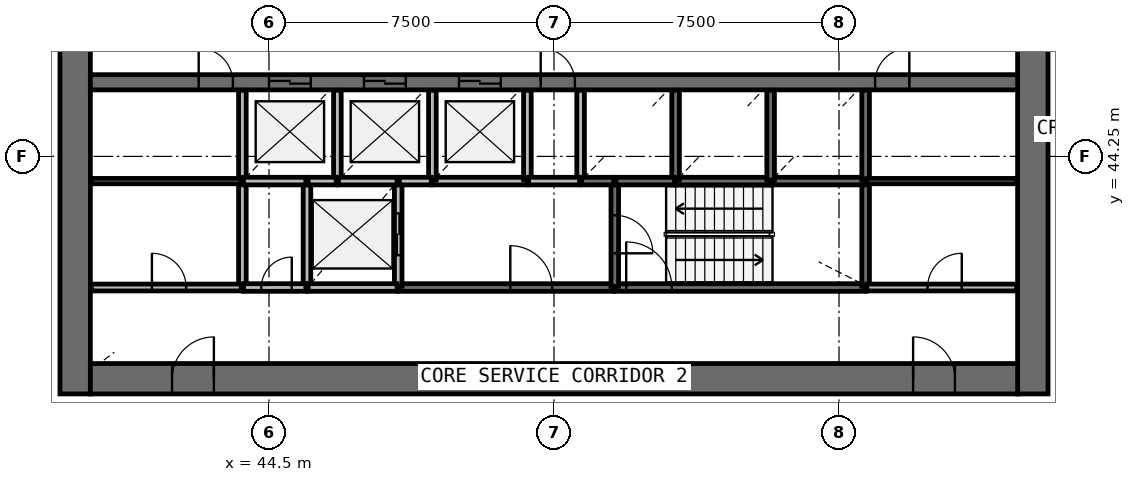
"""IFC4 building model, lengths in metres.
Left out: names, types, materials, properties, quantities, classifications, styles, units other than length and angle.
Written with IfcOpenShell. Run it as: python <this file> out.ifc"""

import sys

from ifc_helpers import new_model, si_unit, direction, frame, frame_2d, origin, place, context, subcontext, project, spatial, rectangle, extrude, source, transform, mapped, element, fill, save


model = new_model("IFC4")
c1 = context("Model", 3, precision=1e-05, world=origin(), true_north=direction((0.0, 1.0)))
c2 = subcontext(c1, "Body", "Model", "MODEL_VIEW")
j1 = project(units=[si_unit("LENGTHUNIT", "METRE"), si_unit("PLANEANGLEUNIT", "RADIAN")], contexts=[c1])
p1 = place(None, origin())
s1 = spatial("IfcSite", under=j1, at=p1, CompositionType="ELEMENT")
p2 = place(p1, origin())
s2 = spatial("IfcBuilding", under=s1, at=p2, CompositionType="ELEMENT")
p3 = place(p2, frame((0.0, 0.0, 124.9)))
s3 = spatial("IfcBuildingStorey", under=s2, at=p3, CompositionType="ELEMENT", Elevation=124.9)
p4 = place(p3, frame((64.6, 38.0, 0.0), z_axis=(0.0, 0.0, 1.0), x_axis=(0.0, 1.0, 0.0)))
e1 = element("IfcWall", 1, at=p4, inside=s3, PredefinedType="SHEAR", context=c2, shape_type="SweptSolid", body=[
    extrude(rectangle(XDim=20.0, YDim=0.8, at=frame_2d((10.0, 0.0))), origin(), (0.0, 0.0, 1.0), 4.1),
])
p5 = place(p4, frame((9.1, 0.0, 0.0)))
e2 = element("IfcOpeningElement", 2, at=p5, cuts=e1, PredefinedType="OPENING", context=c2, shape_type="SweptSolid", body=[
    extrude(rectangle(XDim=1.8, YDim=2.1, at=frame_2d((0.9, 1.05))), frame((0.0, 0.41, 0.0), z_axis=(0.0, -1.0, 0.0), x_axis=(1.0, 0.0, 0.0)), (0.0, 0.0, 1.0), 0.82),
])
p6 = place(p3, frame((39.4, 58.0, 0.0), z_axis=(0.0, 0.0, 1.0), x_axis=(0.0, -1.0, 0.0)))
e3 = element("IfcWall", 3, at=p6, inside=s3, PredefinedType="SHEAR", context=c2, shape_type="SweptSolid", body=[
    extrude(rectangle(XDim=20.0, YDim=0.8, at=frame_2d((10.0, 0.0))), origin(), (0.0, 0.0, 1.0), 4.1),
])
p7 = place(p6, frame((9.1, 0.0, 0.0)))
e4 = element("IfcOpeningElement", 4, at=p7, cuts=e3, PredefinedType="OPENING", context=c2, shape_type="SweptSolid", body=[
    extrude(rectangle(XDim=1.8, YDim=2.1, at=frame_2d((0.9, 1.05))), frame((0.0, 0.41, 0.0), z_axis=(0.0, -1.0, 0.0), x_axis=(1.0, 0.0, 0.0)), (0.0, 0.0, 1.0), 0.82),
])
p8 = place(p3, frame((39.8, 38.4, 0.0), z_axis=(0.0, 0.0, 1.0), x_axis=(1.0, 0.0, 0.0)))
e5 = element("IfcWall", 5, at=p8, inside=s3, PredefinedType="SHEAR", context=c2, shape_type="SweptSolid", body=[
    extrude(rectangle(XDim=24.4, YDim=0.8, at=frame_2d((12.2, 0.0))), origin(), (0.0, 0.0, 1.0), 4.1),
])
p9 = place(p8, frame((21.65, 0.0, 0.0)))
e6 = element("IfcOpeningElement", 6, at=p9, cuts=e5, PredefinedType="OPENING", context=c2, shape_type="SweptSolid", body=[
    extrude(rectangle(XDim=1.1, YDim=2.1, at=frame_2d((0.55, 1.05))), frame((0.0, 0.41, 0.0), z_axis=(0.0, -1.0, 0.0), x_axis=(1.0, 0.0, 0.0)), (0.0, 0.0, 1.0), 0.82),
])
p10 = place(p8, frame((2.15, 0.0, 0.0)))
e7 = element("IfcOpeningElement", 7, at=p10, cuts=e5, PredefinedType="OPENING", context=c2, shape_type="SweptSolid", body=[
    extrude(rectangle(XDim=1.1, YDim=2.1, at=frame_2d((0.55, 1.05))), frame((0.0, 0.41, 0.0), z_axis=(0.0, -1.0, 0.0), x_axis=(1.0, 0.0, 0.0)), (0.0, 0.0, 1.0), 0.82),
])
p11 = place(p3, frame((39.8, 46.2, 0.0), z_axis=(0.0, 0.0, 1.0), x_axis=(1.0, 0.0, 0.0)))
e8 = element("IfcWall", 8, at=p11, inside=s3, PredefinedType="SHEAR", context=c2, shape_type="SweptSolid", body=[
    extrude(rectangle(XDim=24.4, YDim=0.4, at=frame_2d((12.2, 0.0))), origin(), (0.0, 0.0, 1.0), 4.1),
])
p12 = place(p11, frame((4.7, 0.0, 0.0)))
e9 = element("IfcOpeningElement", 9, at=p12, cuts=e8, PredefinedType="OPENING", context=c2, shape_type="SweptSolid", body=[
    extrude(rectangle(XDim=1.1, YDim=2.1, at=frame_2d((0.55, 1.05))), frame((0.0, 0.21, 0.0), z_axis=(0.0, -1.0, 0.0), x_axis=(1.0, 0.0, 0.0)), (0.0, 0.0, 1.0), 0.42),
])
p13 = place(p11, frame((7.2, 0.0, 0.0)))
e10 = element("IfcOpeningElement", 10, at=p13, cuts=e8, PredefinedType="OPENING", context=c2, shape_type="SweptSolid", body=[
    extrude(rectangle(XDim=1.1, YDim=2.1, at=frame_2d((0.55, 1.05))), frame((0.0, 0.21, 0.0), z_axis=(0.0, -1.0, 0.0), x_axis=(1.0, 0.0, 0.0)), (0.0, 0.0, 1.0), 0.42),
])
p14 = place(p11, frame((9.7, 0.0, 0.0)))
e11 = element("IfcOpeningElement", 11, at=p14, cuts=e8, PredefinedType="OPENING", context=c2, shape_type="SweptSolid", body=[
    extrude(rectangle(XDim=1.1, YDim=2.1, at=frame_2d((0.55, 1.05))), frame((0.0, 0.21, 0.0), z_axis=(0.0, -1.0, 0.0), x_axis=(1.0, 0.0, 0.0)), (0.0, 0.0, 1.0), 0.42),
])
p15 = place(p11, frame((20.65, 0.0, 0.0)))
e12 = element("IfcOpeningElement", 12, at=p15, cuts=e8, PredefinedType="OPENING", context=c2, shape_type="SweptSolid", body=[
    extrude(rectangle(XDim=0.9, YDim=2.1, at=frame_2d((0.45, 1.05))), frame((0.0, 0.21, 0.0), z_axis=(0.0, -1.0, 0.0), x_axis=(1.0, 0.0, 0.0)), (0.0, 0.0, 1.0), 0.42),
])
p16 = place(p11, frame((2.85, 0.0, 0.0)))
e13 = element("IfcOpeningElement", 13, at=p16, cuts=e8, PredefinedType="OPENING", context=c2, shape_type="SweptSolid", body=[
    extrude(rectangle(XDim=0.9, YDim=2.1, at=frame_2d((0.45, 1.05))), frame((0.0, 0.21, 0.0), z_axis=(0.0, -1.0, 0.0), x_axis=(1.0, 0.0, 0.0)), (0.0, 0.0, 1.0), 0.42),
])
p17 = place(p11, frame((11.85, 0.0, 0.0)))
e14 = element("IfcOpeningElement", 14, at=p17, cuts=e8, PredefinedType="OPENING", context=c2, shape_type="SweptSolid", body=[
    extrude(rectangle(XDim=0.9, YDim=2.1, at=frame_2d((0.45, 1.05))), frame((0.0, 0.21, 0.0), z_axis=(0.0, -1.0, 0.0), x_axis=(1.0, 0.0, 0.0)), (0.0, 0.0, 1.0), 0.42),
])
p18 = place(p3, frame((53.6, 40.8, 0.0), z_axis=(0.0, 0.0, 1.0), x_axis=(1.0, 0.0, 0.0)))
e15 = element("IfcWall", 15, at=p18, inside=s3, PredefinedType="SOLIDWALL", context=c2, shape_type="SweptSolid", body=[
    extrude(rectangle(XDim=6.6, YDim=0.2, at=frame_2d((3.3, 0.0))), origin(), (0.0, 0.0, 1.0), 3.6),
])
p19 = place(p18, frame((0.3, 0.0, 0.0)))
e16 = element("IfcOpeningElement", 16, at=p19, cuts=e15, PredefinedType="OPENING", context=c2, shape_type="SweptSolid", body=[
    extrude(rectangle(XDim=1.2, YDim=2.1, at=frame_2d((0.6, 1.05))), frame((0.0, 0.11, 0.0), z_axis=(0.0, -1.0, 0.0), x_axis=(1.0, 0.0, 0.0)), (0.0, 0.0, 1.0), 0.22),
])
p20 = place(p3, frame((47.9, 40.8, 0.0), z_axis=(0.0, 0.0, 1.0), x_axis=(1.0, 0.0, 0.0)))
e17 = element("IfcWall", 17, at=p20, inside=s3, PredefinedType="SOLIDWALL", context=c2, shape_type="SweptSolid", body=[
    extrude(rectangle(XDim=5.67, YDim=0.2, at=frame_2d((2.835, 0.0))), origin(), (0.0, 0.0, 1.0), 3.6),
])
p21 = place(p20, frame((2.95, 0.0, 0.0)))
e18 = element("IfcOpeningElement", 18, at=p21, cuts=e17, PredefinedType="OPENING", context=c2, shape_type="SweptSolid", body=[
    extrude(rectangle(XDim=1.1, YDim=2.1, at=frame_2d((0.55, 1.05))), frame((0.0, 0.11, 0.0), z_axis=(0.0, -1.0, 0.0), x_axis=(1.0, 0.0, 0.0)), (0.0, 0.0, 1.0), 0.22),
])
for number, where, z_axis, x_axis in (
    (19, (43.8, 43.6, 0.0), (0.0, 0.0, 1.0), (0.0, -1.0, 0.0)),
    (20, (45.5, 43.6, 0.0), (0.0, 0.0, 1.0), (0.0, -1.0, 0.0)),
):
    element("IfcWall", number, at=place(p3, frame(where, z_axis=z_axis, x_axis=x_axis)), inside=s3, PredefinedType="SOLIDWALL", context=c2, shape_type="SweptSolid", body=[
        extrude(rectangle(XDim=2.8, YDim=0.2, at=frame_2d((1.4, 0.0))), origin(), (0.0, 0.0, 1.0), 3.6),
    ])
p22 = place(p3, frame((47.9, 40.83, 0.0), z_axis=(0.0, 0.0, 1.0), x_axis=(0.0, 1.0, 0.0)))
e21 = element("IfcWall", 21, at=p22, inside=s3, PredefinedType="SOLIDWALL", context=c2, shape_type="SweptSolid", body=[
    extrude(rectangle(XDim=2.77, YDim=0.2, at=frame_2d((1.385, 0.0))), origin(), (0.0, 0.0, 1.0), 3.6),
])
p23 = place(p22, frame((0.82, 0.0, 0.0)))
e22 = element("IfcOpeningElement", 22, at=p23, cuts=e21, PredefinedType="OPENING", context=c2, shape_type="SweptSolid", body=[
    extrude(rectangle(XDim=1.1, YDim=2.1, at=frame_2d((0.55, 1.05))), frame((0.0, 0.11, 0.0), z_axis=(0.0, -1.0, 0.0), x_axis=(1.0, 0.0, 0.0)), (0.0, 0.0, 1.0), 0.22),
])
p24 = place(p3, frame((60.2, 40.83, 0.0), z_axis=(0.0, 0.0, 1.0), x_axis=(0.0, 1.0, 0.0)))
e23 = element("IfcWall", 23, at=p24, inside=s3, PredefinedType="SOLIDWALL", context=c2, shape_type="SweptSolid", body=[
    extrude(rectangle(XDim=2.77, YDim=0.2, at=frame_2d((1.385, 0.0))), origin(), (0.0, 0.0, 1.0), 3.6),
])
p25 = place(p3, frame((53.6, 43.6, 0.0), z_axis=(0.0, 0.0, 1.0), x_axis=(0.0, -1.0, 0.0)))
e24 = element("IfcWall", 24, at=p25, inside=s3, PredefinedType="SOLIDWALL", context=c2, shape_type="SweptSolid", body=[
    extrude(rectangle(XDim=2.77, YDim=0.2, at=frame_2d((1.385, 0.0))), origin(), (0.0, 0.0, 1.0), 3.6),
])
p26 = place(p25, frame((0.9, 0.0, 0.0)))
e25 = element("IfcOpeningElement", 25, at=p26, cuts=e24, PredefinedType="OPENING", context=c2, shape_type="SweptSolid", body=[
    extrude(rectangle(XDim=1.0, YDim=2.1, at=frame_2d((0.5, 1.05))), frame((0.0, 0.11, 0.0), z_axis=(0.0, -1.0, 0.0), x_axis=(1.0, 0.0, 0.0)), (0.0, 0.0, 1.0), 0.22),
])
for number, where, z_axis, x_axis in (
    (26, (48.8, 43.6, 0.0), (0.0, 0.0, 1.0), (1.0, 0.0, 0.0)),
    (27, (55.2, 43.6, 0.0), (0.0, 0.0, 1.0), (1.0, 0.0, 0.0)),
):
    element("IfcWall", number, at=place(p3, frame(where, z_axis=z_axis, x_axis=x_axis)), inside=s3, PredefinedType="SOLIDWALL", context=c2, shape_type="SweptSolid", body=[
        extrude(rectangle(XDim=2.5, YDim=0.2, at=frame_2d((1.25, 0.0))), origin(), (0.0, 0.0, 1.0), 3.6),
    ])
p27 = place(p3, frame((57.73, 43.6, 0.0), z_axis=(0.0, 0.0, 1.0), x_axis=(1.0, 0.0, 0.0)))
e28 = element("IfcWall", 28, at=p27, inside=s3, PredefinedType="SOLIDWALL", context=c2, shape_type="SweptSolid", body=[
    extrude(rectangle(XDim=2.44, YDim=0.2, at=frame_2d((1.22, 0.0))), origin(), (0.0, 0.0, 1.0), 3.6),
])
p28 = place(p3, frame((45.53, 40.8, 0.0), z_axis=(0.0, 0.0, 1.0), x_axis=(1.0, 0.0, 0.0)))
e29 = element("IfcWall", 29, at=p28, inside=s3, PredefinedType="SOLIDWALL", context=c2, shape_type="SweptSolid", body=[
    extrude(rectangle(XDim=2.34, YDim=0.2, at=frame_2d((1.17, 0.0))), origin(), (0.0, 0.0, 1.0), 3.6),
])
p29 = place(p3, frame((43.8, 45.99, 0.0), z_axis=(0.0, 0.0, 1.0), x_axis=(0.0, -1.0, 0.0)))
e30 = element("IfcWall", 30, at=p29, inside=s3, PredefinedType="SOLIDWALL", context=c2, shape_type="SweptSolid", body=[
    extrude(rectangle(XDim=2.36, YDim=0.2, at=frame_2d((1.18, 0.0))), origin(), (0.0, 0.0, 1.0), 3.6),
])
p30 = place(p3, frame((46.3, 43.6, 0.0), z_axis=(0.0, 0.0, 1.0), x_axis=(0.0, 1.0, 0.0)))
e31 = element("IfcWall", 31, at=p30, inside=s3, PredefinedType="SOLIDWALL", context=c2, shape_type="SweptSolid", body=[
    extrude(rectangle(XDim=2.39, YDim=0.2, at=frame_2d((1.195, 0.0))), origin(), (0.0, 0.0, 1.0), 3.6),
])
for number, where, z_axis, x_axis in (
    (32, (48.8, 43.63, 0.0), (0.0, 0.0, 1.0), (0.0, 1.0, 0.0)),
    (33, (51.3, 43.63, 0.0), (0.0, 0.0, 1.0), (0.0, 1.0, 0.0)),
):
    element("IfcWall", number, at=place(p3, frame(where, z_axis=z_axis, x_axis=x_axis)), inside=s3, PredefinedType="SOLIDWALL", context=c2, shape_type="SweptSolid", body=[
        extrude(rectangle(XDim=2.36, YDim=0.2, at=frame_2d((1.18, 0.0))), origin(), (0.0, 0.0, 1.0), 3.6),
    ])
p31 = place(p3, frame((52.7, 45.99, 0.0), z_axis=(0.0, 0.0, 1.0), x_axis=(0.0, -1.0, 0.0)))
e34 = element("IfcWall", 34, at=p31, inside=s3, PredefinedType="SOLIDWALL", context=c2, shape_type="SweptSolid", body=[
    extrude(rectangle(XDim=2.39, YDim=0.2, at=frame_2d((1.195, 0.0))), origin(), (0.0, 0.0, 1.0), 3.6),
])
for number, where, z_axis, x_axis in (
    (35, (55.2, 43.63, 0.0), (0.0, 0.0, 1.0), (0.0, 1.0, 0.0)),
    (36, (57.7, 43.63, 0.0), (0.0, 0.0, 1.0), (0.0, 1.0, 0.0)),
    (37, (60.2, 43.63, 0.0), (0.0, 0.0, 1.0), (0.0, 1.0, 0.0)),
):
    element("IfcWall", number, at=place(p3, frame(where, z_axis=z_axis, x_axis=x_axis)), inside=s3, PredefinedType="SOLIDWALL", context=c2, shape_type="SweptSolid", body=[
        extrude(rectangle(XDim=2.36, YDim=0.2, at=frame_2d((1.18, 0.0))), origin(), (0.0, 0.0, 1.0), 3.6),
    ])
p32 = place(p3, frame((43.83, 43.6, 0.0), z_axis=(0.0, 0.0, 1.0), x_axis=(1.0, 0.0, 0.0)))
e38 = element("IfcWall", 38, at=p32, inside=s3, PredefinedType="SOLIDWALL", context=c2, shape_type="SweptSolid", body=[
    extrude(rectangle(XDim=1.64, YDim=0.2, at=frame_2d((0.82, 0.0))), origin(), (0.0, 0.0, 1.0), 3.6),
])
p33 = place(p3, frame((43.83, 40.8, 0.0), z_axis=(0.0, 0.0, 1.0), x_axis=(1.0, 0.0, 0.0)))
e39 = element("IfcWall", 39, at=p33, inside=s3, PredefinedType="SOLIDWALL", context=c2, shape_type="SweptSolid", body=[
    extrude(rectangle(XDim=1.64, YDim=0.2, at=frame_2d((0.82, 0.0))), origin(), (0.0, 0.0, 1.0), 3.6),
])
p34 = place(p33, frame((0.47, 0.0, 0.0)))
e40 = element("IfcOpeningElement", 40, at=p34, cuts=e39, PredefinedType="OPENING", context=c2, shape_type="SweptSolid", body=[
    extrude(rectangle(XDim=0.8, YDim=2.1, at=frame_2d((0.4, 1.05))), frame((0.0, 0.11, 0.0), z_axis=(0.0, -1.0, 0.0), x_axis=(1.0, 0.0, 0.0)), (0.0, 0.0, 1.0), 0.22),
])
for number, where, z_axis, x_axis in (
    (41, (46.33, 43.6, 0.0), (0.0, 0.0, 1.0), (1.0, 0.0, 0.0)),
    (42, (53.63, 43.6, 0.0), (0.0, 0.0, 1.0), (1.0, 0.0, 0.0)),
):
    element("IfcWall", number, at=place(p3, frame(where, z_axis=z_axis, x_axis=x_axis)), inside=s3, PredefinedType="SOLIDWALL", context=c2, shape_type="SweptSolid", body=[
        extrude(rectangle(XDim=1.54, YDim=0.2, at=frame_2d((0.77, 0.0))), origin(), (0.0, 0.0, 1.0), 3.6),
    ])
p35 = place(p3, frame((52.67, 43.6, 0.0), z_axis=(0.0, 0.0, 1.0), x_axis=(-1.0, 0.0, 0.0)))
e43 = element("IfcWall", 43, at=p35, inside=s3, PredefinedType="SOLIDWALL", context=c2, shape_type="SweptSolid", body=[
    extrude(rectangle(XDim=1.34, YDim=0.2, at=frame_2d((0.67, 0.0))), origin(), (0.0, 0.0, 1.0), 3.6),
])
for number, where, z_axis, x_axis in (
    (44, (47.93, 43.6, 0.0), (0.0, 0.0, 1.0), (1.0, 0.0, 0.0)),
    (45, (52.73, 43.6, 0.0), (0.0, 0.0, 1.0), (1.0, 0.0, 0.0)),
):
    element("IfcWall", number, at=place(p3, frame(where, z_axis=z_axis, x_axis=x_axis)), inside=s3, PredefinedType="SOLIDWALL", context=c2, shape_type="SweptSolid", body=[
        extrude(rectangle(XDim=0.84, YDim=0.2, at=frame_2d((0.42, 0.0))), origin(), (0.0, 0.0, 1.0), 3.6),
    ])
p36 = place(p3, frame((45.53, 43.6, 0.0), z_axis=(0.0, 0.0, 1.0), x_axis=(1.0, 0.0, 0.0)))
e46 = element("IfcWall", 46, at=p36, inside=s3, PredefinedType="SOLIDWALL", context=c2, shape_type="SweptSolid", body=[
    extrude(rectangle(XDim=0.74, YDim=0.2, at=frame_2d((0.37, 0.0))), origin(), (0.0, 0.0, 1.0), 3.6),
])
p37 = place(p3, frame((60.23, 40.8, 0.0), z_axis=(0.0, 0.0, 1.0), x_axis=(1.0, 0.0, 0.0)))
e47 = element("IfcWall", 47, at=p37, inside=s3, PredefinedType="PARTITIONING", context=c2, shape_type="SweptSolid", body=[
    extrude(rectangle(XDim=3.95, YDim=0.18, at=frame_2d((1.975, 0.0))), origin(), (0.0, 0.0, 1.0), 3.6),
])
p38 = place(p37, frame((1.6, 0.0, 0.0)))
e48 = element("IfcOpeningElement", 48, at=p38, cuts=e47, PredefinedType="OPENING", context=c2, shape_type="SweptSolid", body=[
    extrude(rectangle(XDim=0.9, YDim=2.1, at=frame_2d((0.45, 1.05))), frame((0.0, 0.1, 0.0), z_axis=(0.0, -1.0, 0.0), x_axis=(1.0, 0.0, 0.0)), (0.0, 0.0, 1.0), 0.2),
])
p39 = place(p3, frame((39.82, 40.8, 0.0), z_axis=(0.0, 0.0, 1.0), x_axis=(1.0, 0.0, 0.0)))
e49 = element("IfcWall", 49, at=p39, inside=s3, PredefinedType="PARTITIONING", context=c2, shape_type="SweptSolid", body=[
    extrude(rectangle(XDim=3.95, YDim=0.18, at=frame_2d((1.975, 0.0))), origin(), (0.0, 0.0, 1.0), 3.6),
])
p40 = place(p39, frame((1.6, 0.0, 0.0)))
e50 = element("IfcOpeningElement", 50, at=p40, cuts=e49, PredefinedType="OPENING", context=c2, shape_type="SweptSolid", body=[
    extrude(rectangle(XDim=0.9, YDim=2.1, at=frame_2d((0.45, 1.05))), frame((0.0, 0.1, 0.0), z_axis=(0.0, -1.0, 0.0), x_axis=(1.0, 0.0, 0.0)), (0.0, 0.0, 1.0), 0.2),
])
for number, where, z_axis, x_axis in (
    (51, (60.23, 43.6, 0.0), (0.0, 0.0, 1.0), (1.0, 0.0, 0.0)),
    (52, (43.77, 43.6, 0.0), (0.0, 0.0, 1.0), (-1.0, 0.0, 0.0)),
):
    element("IfcWall", number, at=place(p3, frame(where, z_axis=z_axis, x_axis=x_axis)), inside=s3, PredefinedType="PARTITIONING", context=c2, shape_type="SweptSolid", body=[
        extrude(rectangle(XDim=3.95, YDim=0.14, at=frame_2d((1.975, 0.0))), origin(), (0.0, 0.0, 1.0), 2.8),
    ])
m1 = source(origin(), c2, "Body", "SweptSolid", [
    extrude(rectangle(XDim=1.1, YDim=2.1, at=frame_2d((0.55, 1.05))), frame((0.0, 0.025, 0.0), z_axis=(0.0, -1.0, 0.0), x_axis=(1.0, 0.0, 0.0)), (0.0, 0.0, 1.0), 0.05),
])
p41 = place(p12, origin())
e53 = element("IfcDoor", 53, at=p41, inside=s3, OperationType="DOUBLE_DOOR_SLIDING", PredefinedType="USERDEFINED", context=c2, shape_type="MappedRepresentation", body=[
    mapped(m1, transform((0.0, 0.0, 0.0), scale=1.0)),
])
fill(e9, e53)
p42 = place(p13, origin())
e54 = element("IfcDoor", 54, at=p42, inside=s3, OperationType="DOUBLE_DOOR_SLIDING", PredefinedType="USERDEFINED", context=c2, shape_type="MappedRepresentation", body=[
    mapped(m1, transform((0.0, 0.0, 0.0), scale=1.0)),
])
fill(e10, e54)
p43 = place(p14, origin())
e55 = element("IfcDoor", 55, at=p43, inside=s3, OperationType="DOUBLE_DOOR_SLIDING", PredefinedType="USERDEFINED", context=c2, shape_type="MappedRepresentation", body=[
    mapped(m1, transform((0.0, 0.0, 0.0), scale=1.0)),
])
fill(e11, e55)
p44 = place(p23, origin())
e56 = element("IfcDoor", 56, at=p44, inside=s3, OperationType="DOUBLE_DOOR_SLIDING", PredefinedType="USERDEFINED", context=c2, shape_type="MappedRepresentation", body=[
    mapped(m1, transform((0.0, 0.0, 0.0), scale=1.0)),
])
fill(e22, e56)
m2 = source(origin(), c2, "Body", "SweptSolid", [
    extrude(rectangle(XDim=1.2, YDim=2.1, at=frame_2d((0.6, 1.05))), frame((0.0, 0.025, 0.0), z_axis=(0.0, -1.0, 0.0), x_axis=(1.0, 0.0, 0.0)), (0.0, 0.0, 1.0), 0.05),
])
p45 = place(p19, origin())
e57 = element("IfcDoor", 57, at=p45, inside=s3, OperationType="SINGLE_SWING_LEFT", PredefinedType="DOOR", context=c2, shape_type="MappedRepresentation", body=[
    mapped(m2, transform((0.0, 0.0, 0.0), scale=1.0)),
])
fill(e16, e57)
m3 = source(origin(), c2, "Body", "SweptSolid", [
    extrude(rectangle(XDim=1.0, YDim=2.1, at=frame_2d((0.5, 1.05))), frame((0.0, 0.025, 0.0), z_axis=(0.0, -1.0, 0.0), x_axis=(1.0, 0.0, 0.0)), (0.0, 0.0, 1.0), 0.05),
])
p46 = place(p26, origin())
e58 = element("IfcDoor", 58, at=p46, inside=s3, OperationType="SINGLE_SWING_RIGHT", PredefinedType="DOOR", context=c2, shape_type="MappedRepresentation", body=[
    mapped(m3, transform((0.0, 0.0, 0.0), scale=1.0)),
])
fill(e25, e58)
m4 = source(origin(), c2, "Body", "SweptSolid", [
    extrude(rectangle(XDim=1.1, YDim=2.1, at=frame_2d((0.55, 1.05))), frame((0.0, 0.025, 0.0), z_axis=(0.0, -1.0, 0.0), x_axis=(1.0, 0.0, 0.0)), (0.0, 0.0, 1.0), 0.05),
])
p47 = place(p21, origin())
e59 = element("IfcDoor", 59, at=p47, inside=s3, OperationType="SINGLE_SWING_LEFT", PredefinedType="DOOR", context=c2, shape_type="MappedRepresentation", body=[
    mapped(m4, transform((0.0, 0.0, 0.0), scale=1.0)),
])
fill(e18, e59)
m5 = source(origin(), c2, "Body", "SweptSolid", [
    extrude(rectangle(XDim=0.8, YDim=2.1, at=frame_2d((0.4, 1.05))), frame((0.0, 0.025, 0.0), z_axis=(0.0, -1.0, 0.0), x_axis=(1.0, 0.0, 0.0)), (0.0, 0.0, 1.0), 0.05),
])
p48 = place(p34, origin())
e60 = element("IfcDoor", 60, at=p48, inside=s3, OperationType="SINGLE_SWING_RIGHT", PredefinedType="DOOR", context=c2, shape_type="MappedRepresentation", body=[
    mapped(m5, transform((0.0, 0.0, 0.0), scale=1.0)),
])
fill(e40, e60)
m6 = source(origin(), c2, "Body", "SweptSolid", [
    extrude(rectangle(XDim=1.1, YDim=2.1, at=frame_2d((0.55, 1.05))), frame((0.0, 0.025, 0.0), z_axis=(0.0, -1.0, 0.0), x_axis=(1.0, 0.0, 0.0)), (0.0, 0.0, 1.0), 0.05),
])
p49 = place(p9, origin())
e61 = element("IfcDoor", 61, at=p49, inside=s3, OperationType="SINGLE_SWING_LEFT", PredefinedType="DOOR", context=c2, shape_type="MappedRepresentation", body=[
    mapped(m6, transform((0.0, 0.0, 0.0), scale=1.0)),
])
fill(e6, e61)
p50 = place(p10, origin())
e62 = element("IfcDoor", 62, at=p50, inside=s3, OperationType="SINGLE_SWING_RIGHT", PredefinedType="DOOR", context=c2, shape_type="MappedRepresentation", body=[
    mapped(m6, transform((0.0, 0.0, 0.0), scale=1.0)),
])
fill(e7, e62)
m7 = source(origin(), c2, "Body", "SweptSolid", [
    extrude(rectangle(XDim=0.9, YDim=2.1, at=frame_2d((0.45, 1.05))), frame((0.0, 0.025, 0.0), z_axis=(0.0, -1.0, 0.0), x_axis=(1.0, 0.0, 0.0)), (0.0, 0.0, 1.0), 0.05),
])
p51 = place(p40, origin())
e63 = element("IfcDoor", 63, at=p51, inside=s3, OperationType="SINGLE_SWING_LEFT", PredefinedType="DOOR", context=c2, shape_type="MappedRepresentation", body=[
    mapped(m7, transform((0.0, 0.0, 0.0), scale=1.0)),
])
fill(e50, e63)
p52 = place(p15, origin())
e64 = element("IfcDoor", 64, at=p52, inside=s3, OperationType="SINGLE_SWING_RIGHT", PredefinedType="DOOR", context=c2, shape_type="MappedRepresentation", body=[
    mapped(m7, transform((0.0, 0.0, 0.0), scale=1.0)),
])
fill(e12, e64)
p53 = place(p38, origin())
e65 = element("IfcDoor", 65, at=p53, inside=s3, OperationType="SINGLE_SWING_RIGHT", PredefinedType="DOOR", context=c2, shape_type="MappedRepresentation", body=[
    mapped(m7, transform((0.0, 0.0, 0.0), scale=1.0)),
])
fill(e48, e65)
p54 = place(p16, origin())
e66 = element("IfcDoor", 66, at=p54, inside=s3, OperationType="SINGLE_SWING_LEFT", PredefinedType="DOOR", context=c2, shape_type="MappedRepresentation", body=[
    mapped(m7, transform((0.0, 0.0, 0.0), scale=1.0)),
])
fill(e13, e66)
p55 = place(p17, origin())
e67 = element("IfcDoor", 67, at=p55, inside=s3, OperationType="SINGLE_SWING_LEFT", PredefinedType="DOOR", context=c2, shape_type="MappedRepresentation", body=[
    mapped(m7, transform((0.0, 0.0, 0.0), scale=1.0)),
])
fill(e14, e67)
save(model, sys.argv[1])
